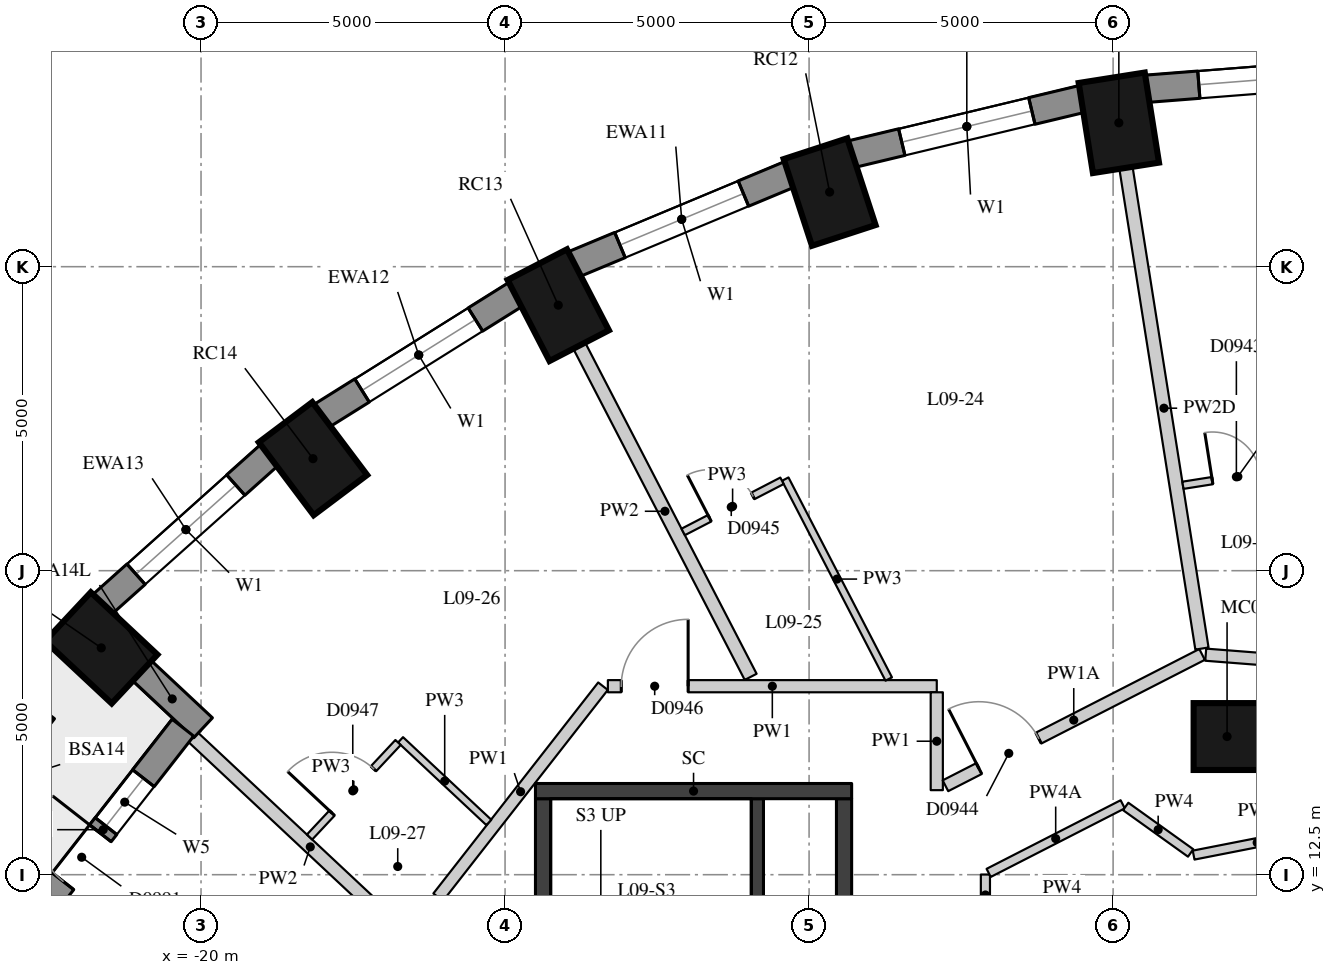
"""IFC4 building model, lengths in metres.
Left out: names, types, materials, properties, quantities, classifications, styles, units other than length and angle.
Written with IfcOpenShell. Run it as: python <this file> out.ifc"""

import sys

from ifc_helpers import new_model, si_unit, direction, frame, frame_2d, origin, origin_2d, place, context, subcontext, project, spatial, rectangle, extrude, element, fill, save


model = new_model("IFC4")
c1 = context("Model", 3, precision=1e-05, world=origin(), true_north=direction((0.0, 1.0)))
c2 = subcontext(c1, "Body", "Model", "MODEL_VIEW")
j1 = project(units=[si_unit("LENGTHUNIT", "METRE"), si_unit("PLANEANGLEUNIT", "RADIAN")], contexts=[c1])
p1 = place(None, origin())
s1 = spatial("IfcSite", under=j1, at=p1, CompositionType="ELEMENT")
p2 = place(p1, origin())
s2 = spatial("IfcBuilding", under=s1, at=p2, CompositionType="ELEMENT")
p3 = place(p2, frame((0.0, 0.0, 38.2)))
s3 = spatial("IfcBuildingStorey", under=s2, at=p3, CompositionType="ELEMENT", Elevation=38.2)
for number, where, z_axis, x_axis in (
    (1, (-4.906, 24.866, 0.0), (0.0, 0.0, 1.0), (-0.156, 0.988, 0.0)),
    (2, (-9.662, 23.727, 0.0), (0.0, 0.0, 1.0), (-0.31, 0.951, 0.0)),
    (3, (-14.125, 21.867, 0.0), (0.0, 0.0, 1.0), (-0.46, 0.888, 0.0)),
    (4, (-18.159, 19.343, 0.0), (0.0, 0.0, 1.0), (-0.601, 0.799, 0.0)),
    (5, (-21.641, 16.23, 0.0), (0.0, 0.0, 1.0), (-0.73, 0.683, 0.0)),
):
    element("IfcColumn", number, at=place(p3, frame(where, z_axis=z_axis, x_axis=x_axis)), inside=s3, PredefinedType="COLUMN", context=c2, shape_type="SweptSolid", body=[
        extrude(rectangle(XDim=1.5, YDim=1.1, at=origin_2d()), origin(), (0.0, 0.0, 1.0), 3.3),
    ])
p4 = place(p3, frame((-3.126, 14.772, 0.0), z_axis=(0.0, 0.0, 1.0), x_axis=(1.0, 0.0, 0.0)))
e6 = element("IfcColumn", 6, at=p4, inside=s3, PredefinedType="COLUMN", context=c2, shape_type="SweptSolid", body=[
    extrude(rectangle(XDim=1.1, YDim=1.1, at=origin_2d()), origin(), (0.0, 0.0, 1.0), 3.3),
])
p5 = place(p3, frame((-0.53, 25.733, 0.0), z_axis=(0.0, 0.0, 1.0), x_axis=(-0.996955972145, -0.077966592873, 0.0)))
e7 = element("IfcWall", 7, at=p5, inside=s3, PredefinedType="SOLIDWALL", context=c2, shape_type="SweptSolid", body=[
    extrude(rectangle(XDim=3.939, YDim=0.45, at=frame_2d((1.97, 0.0))), origin(), (0.0, 0.0, 1.0), 3.02),
])
p6 = place(p5, frame((0.87, 0.0, 0.4)))
e8 = element("IfcOpeningElement", 8, at=p6, cuts=e7, PredefinedType="OPENING", context=c2, shape_type="SweptSolid", body=[
    extrude(rectangle(XDim=2.2, YDim=1.75, at=frame_2d((1.1, 0.875))), frame((0.0, 0.235, 0.0), z_axis=(0.0, -1.0, 0.0), x_axis=(1.0, 0.0, 0.0)), (0.0, 0.0, 1.0), 0.47),
])
p7 = place(p3, frame((-5.504, 25.26, 0.0), z_axis=(0.0, 0.0, 1.0), x_axis=(-0.972496561493, -0.232917233979, 0.0)))
e9 = element("IfcWall", 9, at=p7, inside=s3, PredefinedType="SOLIDWALL", context=c2, shape_type="SweptSolid", body=[
    extrude(rectangle(XDim=3.911, YDim=0.45, at=frame_2d((1.956, 0.0))), origin(), (0.0, 0.0, 1.0), 3.02),
])
p8 = place(p7, frame((0.855, 0.0, 0.4)))
e10 = element("IfcOpeningElement", 10, at=p8, cuts=e9, PredefinedType="OPENING", context=c2, shape_type="SweptSolid", body=[
    extrude(rectangle(XDim=2.2, YDim=1.75, at=frame_2d((1.1, 0.875))), frame((0.0, 0.235, 0.0), z_axis=(0.0, -1.0, 0.0), x_axis=(1.0, 0.0, 0.0)), (0.0, 0.0, 1.0), 0.47),
])
p9 = place(p3, frame((-10.315, 24.021, 0.0), z_axis=(0.0, 0.0, 1.0), x_axis=(-0.923031964282, -0.384723267966, 0.0)))
e11 = element("IfcWall", 11, at=p9, inside=s3, PredefinedType="SOLIDWALL", context=c2, shape_type="SweptSolid", body=[
    extrude(rectangle(XDim=3.856, YDim=0.45, at=frame_2d((1.928, 0.0))), origin(), (0.0, 0.0, 1.0), 3.02),
])
p10 = place(p9, frame((0.828, 0.0, 0.4)))
e12 = element("IfcOpeningElement", 12, at=p10, cuts=e11, PredefinedType="OPENING", context=c2, shape_type="SweptSolid", body=[
    extrude(rectangle(XDim=2.2, YDim=1.75, at=frame_2d((1.1, 0.875))), frame((0.0, 0.235, 0.0), z_axis=(0.0, -1.0, 0.0), x_axis=(1.0, 0.0, 0.0)), (0.0, 0.0, 1.0), 0.47),
])
p11 = place(p3, frame((-14.817, 22.051, 0.0), z_axis=(0.0, 0.0, 1.0), x_axis=(-0.847635480093, -0.530579016629, 0.0)))
e13 = element("IfcWall", 13, at=p11, inside=s3, PredefinedType="SOLIDWALL", context=c2, shape_type="SweptSolid", body=[
    extrude(rectangle(XDim=3.782, YDim=0.45, at=frame_2d((1.891, 0.0))), origin(), (0.0, 0.0, 1.0), 3.02),
])
p12 = place(p11, frame((0.791, 0.0, 0.4)))
e14 = element("IfcOpeningElement", 14, at=p12, cuts=e13, PredefinedType="OPENING", context=c2, shape_type="SweptSolid", body=[
    extrude(rectangle(XDim=2.2, YDim=1.75, at=frame_2d((1.1, 0.875))), frame((0.0, 0.235, 0.0), z_axis=(0.0, -1.0, 0.0), x_axis=(1.0, 0.0, 0.0)), (0.0, 0.0, 1.0), 0.47),
])
p13 = place(p3, frame((-18.871, 19.407, 0.0), z_axis=(0.0, 0.0, 1.0), x_axis=(-0.745526233716, -0.66647628228, 0.0)))
e15 = element("IfcWall", 15, at=p13, inside=s3, PredefinedType="SOLIDWALL", context=c2, shape_type="SweptSolid", body=[
    extrude(rectangle(XDim=3.697, YDim=0.45, at=frame_2d((1.848, 0.0))), origin(), (0.0, 0.0, 1.0), 3.02),
])
p14 = place(p13, frame((0.749, 0.0, 0.4)))
e16 = element("IfcOpeningElement", 16, at=p14, cuts=e15, PredefinedType="OPENING", context=c2, shape_type="SweptSolid", body=[
    extrude(rectangle(XDim=2.2, YDim=1.75, at=frame_2d((1.1, 0.875))), frame((0.0, 0.235, 0.0), z_axis=(0.0, -1.0, 0.0), x_axis=(1.0, 0.0, 0.0)), (0.0, 0.0, 1.0), 0.47),
])
p15 = place(p3, frame((-20.982, 15.866, 0.0), z_axis=(0.0, 0.0, 1.0), x_axis=(0.730062381614, -0.683380508174, 0.0)))
e17 = element("IfcWall", 17, at=p15, inside=s3, PredefinedType="SOLIDWALL", context=c2, shape_type="SweptSolid", body=[
    extrude(rectangle(XDim=1.391, YDim=0.45, at=frame_2d((0.696, 0.0))), origin(), (0.0, 0.0, 1.0), 3.02),
])
p16 = place(p3, frame((-20.298, 14.918, 0.0), z_axis=(0.0, 0.0, 1.0), x_axis=(-0.615578403957, -0.788075649022, 0.0)))
e18 = element("IfcWall", 18, at=p16, inside=s3, PredefinedType="SOLIDWALL", context=c2, shape_type="SweptSolid", body=[
    extrude(rectangle(XDim=4.259, YDim=0.45, at=frame_2d((2.129, 0.0))), origin(), (0.0, 0.0, 1.0), 3.02),
])
p17 = place(p16, frame((1.054, 0.0, 0.4)))
e19 = element("IfcOpeningElement", 19, at=p17, cuts=e18, PredefinedType="OPENING", context=c2, shape_type="SweptSolid", body=[
    extrude(rectangle(XDim=1.0, YDim=1.75, at=frame_2d((0.5, 0.875))), frame((0.0, 0.235, 0.0), z_axis=(0.0, -1.0, 0.0), x_axis=(1.0, 0.0, 0.0)), (0.0, 0.0, 1.0), 0.47),
])
p18 = place(p16, frame((2.204, 0.0, 0.0)))
e20 = element("IfcOpeningElement", 20, at=p18, cuts=e18, PredefinedType="OPENING", context=c2, shape_type="SweptSolid", body=[
    extrude(rectangle(XDim=1.0, YDim=2.15, at=frame_2d((0.5, 1.075))), frame((0.0, 0.235, 0.0), z_axis=(0.0, -1.0, 0.0), x_axis=(1.0, 0.0, 0.0)), (0.0, 0.0, 1.0), 0.47),
])
p19 = place(p3, frame((-22.686, 15.281, 0.0), z_axis=(0.0, 0.0, 1.0), x_axis=(-0.616622746332, -0.787258781282, 0.0)))
e21 = element("IfcWall", 21, at=p19, inside=s3, PredefinedType="USERDEFINED", context=c2, shape_type="SweptSolid", body=[
    extrude(rectangle(XDim=1.8, YDim=0.7, at=frame_2d((0.9, 0.0))), origin(), (0.0, 0.0, 1.0), 0.75),
])
p20 = place(p3, frame((-10.85, 7.75, 0.0), z_axis=(0.0, 0.0, 1.0), x_axis=(0.0, 1.0, 0.0)))
e22 = element("IfcWall", 22, at=p20, inside=s3, PredefinedType="SHEAR", context=c2, shape_type="SweptSolid", body=[
    extrude(rectangle(XDim=6.0, YDim=0.2, at=frame_2d((3.0, 0.0))), origin(), (0.0, 0.0, 1.0), 3.02),
])
p21 = place(p20, frame((0.1, 0.0, 0.0)))
e23 = element("IfcOpeningElement", 23, at=p21, cuts=e22, PredefinedType="OPENING", context=c2, shape_type="SweptSolid", body=[
    extrude(rectangle(XDim=1.5, YDim=2.1, at=frame_2d((0.75, 1.05))), frame((0.0, 0.11, 0.0), z_axis=(0.0, -1.0, 0.0), x_axis=(1.0, 0.0, 0.0)), (0.0, 0.0, 1.0), 0.22),
])
p22 = place(p3, frame((-14.375, 7.75, -0.28), z_axis=(0.0, 0.0, 1.0), x_axis=(0.0, 1.0, 0.0)))
e24 = element("IfcWall", 24, at=p22, inside=s3, PredefinedType="SHEAR", context=c2, shape_type="SweptSolid", body=[
    extrude(rectangle(XDim=6.0, YDim=0.25, at=frame_2d((3.0, 0.0))), origin(), (0.0, 0.0, 1.0), 3.3),
])
p23 = place(p3, frame((-9.425, 7.75, -0.28), z_axis=(0.0, 0.0, 1.0), x_axis=(0.0, 1.0, 0.0)))
e25 = element("IfcWall", 25, at=p23, inside=s3, PredefinedType="SHEAR", context=c2, shape_type="SweptSolid", body=[
    extrude(rectangle(XDim=6.0, YDim=0.25, at=frame_2d((3.0, 0.0))), origin(), (0.0, 0.0, 1.0), 3.3),
])
p24 = place(p23, frame((2.1, 0.0, 0.28)))
e26 = element("IfcOpeningElement", 26, at=p24, cuts=e25, PredefinedType="OPENING", context=c2, shape_type="SweptSolid", body=[
    extrude(rectangle(XDim=1.5, YDim=2.1, at=frame_2d((0.75, 1.05))), frame((0.0, 0.135, 0.0), z_axis=(0.0, -1.0, 0.0), x_axis=(1.0, 0.0, 0.0)), (0.0, 0.0, 1.0), 0.27),
])
p25 = place(p3, frame((-14.5, 13.875, -0.28), z_axis=(0.0, 0.0, 1.0), x_axis=(1.0, 0.0, 0.0)))
e27 = element("IfcWall", 27, at=p25, inside=s3, PredefinedType="SHEAR", context=c2, shape_type="SweptSolid", body=[
    extrude(rectangle(XDim=5.2, YDim=0.25, at=frame_2d((2.6, 0.0))), origin(), (0.0, 0.0, 1.0), 3.3),
])
p26 = place(p3, frame((-16.1, 12.13, 0.0), z_axis=(0.0, 0.0, 1.0), x_axis=(0.615593476668, 0.788063875256, 0.0)))
e28 = element("IfcWall", 28, at=p26, inside=s3, PredefinedType="PARTITIONING", context=c2, shape_type="SweptSolid", body=[
    extrude(rectangle(XDim=4.404, YDim=0.2, at=frame_2d((2.202, 0.0))), origin(), (0.0, 0.0, 1.0), 3.02),
])
p27 = place(p3, frame((-13.309, 15.6, 0.0), z_axis=(0.0, 0.0, 1.0), x_axis=(1.0, 0.0, 0.0)))
e29 = element("IfcWall", 29, at=p27, inside=s3, PredefinedType="PARTITIONING", context=c2, shape_type="SweptSolid", body=[
    extrude(rectangle(XDim=5.409, YDim=0.2, at=frame_2d((2.705, 0.0))), origin(), (0.0, 0.0, 1.0), 3.02),
])
p28 = place(p27, frame((0.22, 0.0, 0.0)))
e30 = element("IfcOpeningElement", 30, at=p28, cuts=e29, PredefinedType="OPENING", context=c2, shape_type="SweptSolid", body=[
    extrude(rectangle(XDim=1.1, YDim=2.1, at=frame_2d((0.55, 1.05))), frame((0.0, 0.11, 0.0), z_axis=(0.0, -1.0, 0.0), x_axis=(1.0, 0.0, 0.0)), (0.0, 0.0, 1.0), 0.22),
])
p29 = place(p3, frame((-7.9, 15.5, 0.0), z_axis=(0.0, 0.0, 1.0), x_axis=(0.0, -1.0, 0.0)))
e31 = element("IfcWall", 31, at=p29, inside=s3, PredefinedType="PARTITIONING", context=c2, shape_type="SweptSolid", body=[
    extrude(rectangle(XDim=1.61, YDim=0.2, at=frame_2d((0.805, 0.0))), origin(), (0.0, 0.0, 1.0), 3.02),
])
p30 = place(p3, frame((-7.757, 13.963, 0.0), z_axis=(0.0, 0.0, 1.0), x_axis=(0.89017531408, 0.455618162722, 0.0)))
e32 = element("IfcWall", 32, at=p30, inside=s3, PredefinedType="PARTITIONING", context=c2, shape_type="SweptSolid", body=[
    extrude(rectangle(XDim=4.741, YDim=0.2, at=frame_2d((2.371, 0.0))), origin(), (0.0, 0.0, 1.0), 2.57),
])
p31 = place(p30, frame((0.62, 0.0, 0.0)))
e33 = element("IfcOpeningElement", 33, at=p31, cuts=e32, PredefinedType="OPENING", context=c2, shape_type="SweptSolid", body=[
    extrude(rectangle(XDim=1.1, YDim=2.1, at=frame_2d((0.55, 1.05))), frame((0.0, 0.11, 0.0), z_axis=(0.0, -1.0, 0.0), x_axis=(1.0, 0.0, 0.0)), (0.0, 0.0, 1.0), 0.22),
])
p32 = place(p3, frame((-3.477, 16.118, 0.0), z_axis=(0.0, 0.0, 1.0), x_axis=(0.996970328684, -0.077782798383, 0.0)))
e34 = element("IfcWall", 34, at=p32, inside=s3, PredefinedType="PARTITIONING", context=c2, shape_type="SweptSolid", body=[
    extrude(rectangle(XDim=10.449, YDim=0.2, at=frame_2d((5.225, 0.0))), origin(), (0.0, 0.0, 1.0), 3.02),
])
p33 = place(p32, frame((2.372, 0.0, 0.0)))
e35 = element("IfcOpeningElement", 35, at=p33, cuts=e34, PredefinedType="OPENING", context=c2, shape_type="SweptSolid", body=[
    extrude(rectangle(XDim=1.1, YDim=2.1, at=frame_2d((0.55, 1.05))), frame((0.0, 0.11, 0.0), z_axis=(0.0, -1.0, 0.0), x_axis=(1.0, 0.0, 0.0)), (0.0, 0.0, 1.0), 0.22),
])
p34 = place(p3, frame((-3.676, 12.822, 0.0), z_axis=(0.0, 0.0, 1.0), x_axis=(0.981284032016, 0.192565958858, 0.0)))
e36 = element("IfcWall", 36, at=p34, inside=s3, PredefinedType="PARTITIONING", context=c2, shape_type="SweptSolid", body=[
    extrude(rectangle(XDim=2.13, YDim=0.15, at=frame_2d((1.065, 0.0))), origin(), (0.0, 0.0, 1.0), 3.02),
])
p35 = place(p3, frame((-7.1, 11.83, 0.0), z_axis=(0.0, 0.0, 1.0), x_axis=(0.0, 1.0, 0.0)))
e37 = element("IfcWall", 37, at=p35, inside=s3, PredefinedType="PARTITIONING", context=c2, shape_type="SweptSolid", body=[
    extrude(rectangle(XDim=0.672, YDim=0.15, at=frame_2d((0.336, 0.0))), origin(), (0.0, 0.0, 1.0), 3.02),
])
p36 = place(p3, frame((-7.047, 12.53, 0.0), z_axis=(0.0, 0.0, 1.0), x_axis=(0.890208185307, 0.455553934032, 0.0)))
e38 = element("IfcWall", 38, at=p36, inside=s3, PredefinedType="PARTITIONING", context=c2, shape_type="SweptSolid", body=[
    extrude(rectangle(XDim=2.477, YDim=0.15, at=frame_2d((1.238, 0.0))), origin(), (0.0, 0.0, 1.0), 2.57),
])
p37 = place(p3, frame((-4.793, 13.623, 0.0), z_axis=(0.0, 0.0, 1.0), x_axis=(0.812853780358, -0.582467794611, 0.0)))
e39 = element("IfcWall", 39, at=p37, inside=s3, PredefinedType="PARTITIONING", context=c2, shape_type="SweptSolid", body=[
    extrude(rectangle(XDim=1.314, YDim=0.15, at=frame_2d((0.657, 0.0))), origin(), (0.0, 0.0, 1.0), 3.02),
])
p38 = place(p3, frame((-4.788, 24.125, 0.0), z_axis=(0.0, 0.0, 1.0), x_axis=(0.156108238506, -0.987739954578, 0.0)))
e40 = element("IfcWall", 40, at=p38, inside=s3, PredefinedType="PARTITIONING", context=c2, shape_type="SweptSolid", body=[
    extrude(rectangle(XDim=8.004, YDim=0.22, at=frame_2d((4.002, 0.0))), origin(), (0.0, 0.0, 1.0), 2.47),
])
p39 = place(p3, frame((-13.78, 21.201, 0.0), z_axis=(0.0, 0.0, 1.0), x_axis=(0.459699000582, -0.888074787878, 0.0)))
e41 = element("IfcWall", 41, at=p39, inside=s3, PredefinedType="PARTITIONING", context=c2, shape_type="SweptSolid", body=[
    extrude(rectangle(XDim=6.134, YDim=0.22, at=frame_2d((3.067, 0.0))), origin(), (0.0, 0.0, 1.0), 3.02),
])
p40 = place(p3, frame((-20.133, 14.764, 0.0), z_axis=(0.0, 0.0, 1.0), x_axis=(0.730065516357, -0.68337715928, 0.0)))
e42 = element("IfcWall", 42, at=p40, inside=s3, PredefinedType="PARTITIONING", context=c2, shape_type="SweptSolid", body=[
    extrude(rectangle(XDim=5.287, YDim=0.22, at=frame_2d((2.643, 0.0))), origin(), (0.0, 0.0, 1.0), 3.02),
])
p41 = place(p3, frame((-8.69, 15.718, 0.0), z_axis=(0.0, 0.0, 1.0), x_axis=(-0.45967225044, 0.888088634189, 0.0)))
e43 = element("IfcWall", 43, at=p41, inside=s3, PredefinedType="PARTITIONING", context=c2, shape_type="SweptSolid", body=[
    extrude(rectangle(XDim=3.702, YDim=0.12, at=frame_2d((1.851, 0.0))), origin(), (0.0, 0.0, 1.0), 3.02),
])
p42 = place(p3, frame((-15.267, 13.359, 0.0), z_axis=(0.0, 0.0, 1.0), x_axis=(-0.730103481834, 0.683336597742, 0.0)))
e44 = element("IfcWall", 44, at=p42, inside=s3, PredefinedType="PARTITIONING", context=c2, shape_type="SweptSolid", body=[
    extrude(rectangle(XDim=1.989, YDim=0.12, at=frame_2d((0.995, 0.0))), origin(), (0.0, 0.0, 1.0), 3.02),
])
p43 = place(p3, frame((-2.044, 19.19, 0.0), z_axis=(0.0, 0.0, 1.0), x_axis=(-0.987722911621, -0.15621603586, 0.0)))
e45 = element("IfcWall", 45, at=p43, inside=s3, PredefinedType="PARTITIONING", context=c2, shape_type="SweptSolid", body=[
    extrude(rectangle(XDim=1.83, YDim=0.12, at=frame_2d((0.915, 0.0))), origin(), (0.0, 0.0, 1.0), 3.02),
])
p44 = place(p43, frame((0.54, 0.0, 0.0)))
e46 = element("IfcOpeningElement", 46, at=p44, cuts=e45, PredefinedType="OPENING", context=c2, shape_type="SweptSolid", body=[
    extrude(rectangle(XDim=0.8, YDim=2.1, at=frame_2d((0.4, 1.05))), frame((0.0, 0.07, 0.0), z_axis=(0.0, -1.0, 0.0), x_axis=(1.0, 0.0, 0.0)), (0.0, 0.0, 1.0), 0.14),
])
p45 = place(p3, frame((-10.445, 18.978, 0.0), z_axis=(0.0, 0.0, 1.0), x_axis=(-0.888095574179, -0.459658842104, 0.0)))
e47 = element("IfcWall", 47, at=p45, inside=s3, PredefinedType="PARTITIONING", context=c2, shape_type="SweptSolid", body=[
    extrude(rectangle(XDim=1.83, YDim=0.12, at=frame_2d((0.915, 0.0))), origin(), (0.0, 0.0, 1.0), 3.02),
])
p46 = place(p45, frame((0.54, 0.0, 0.0)))
e48 = element("IfcOpeningElement", 48, at=p46, cuts=e47, PredefinedType="OPENING", context=c2, shape_type="SweptSolid", body=[
    extrude(rectangle(XDim=0.8, YDim=2.1, at=frame_2d((0.4, 1.05))), frame((0.0, 0.07, 0.0), z_axis=(0.0, -1.0, 0.0), x_axis=(1.0, 0.0, 0.0)), (0.0, 0.0, 1.0), 0.14),
])
p47 = place(p3, frame((-16.76, 14.674, 0.0), z_axis=(0.0, 0.0, 1.0), x_axis=(-0.683334594436, -0.730105356813, 0.0)))
e49 = element("IfcWall", 49, at=p47, inside=s3, PredefinedType="PARTITIONING", context=c2, shape_type="SweptSolid", body=[
    extrude(rectangle(XDim=2.13, YDim=0.12, at=frame_2d((1.065, 0.0))), origin(), (0.0, 0.0, 1.0), 3.02),
])
p48 = place(p47, frame((0.59, 0.0, 0.0)))
e50 = element("IfcOpeningElement", 50, at=p48, cuts=e49, PredefinedType="OPENING", context=c2, shape_type="SweptSolid", body=[
    extrude(rectangle(XDim=1.0, YDim=2.1, at=frame_2d((0.5, 1.05))), frame((0.0, 0.07, 0.0), z_axis=(0.0, -1.0, 0.0), x_axis=(1.0, 0.0, 0.0)), (0.0, 0.0, 1.0), 0.14),
])
p49 = place(p6, origin())
e51 = element("IfcWindow", 51, at=p49, inside=s3, PartitioningType="SINGLE_PANEL", PredefinedType="WINDOW", context=c2, shape_type="SweptSolid", body=[
    extrude(rectangle(XDim=2.2, YDim=1.75, at=frame_2d((1.1, 0.875))), frame((0.0, 0.035, 0.0), z_axis=(0.0, -1.0, 0.0), x_axis=(1.0, 0.0, 0.0)), (0.0, 0.0, 1.0), 0.06),
])
fill(e8, e51)
p50 = place(p8, origin())
e52 = element("IfcWindow", 52, at=p50, inside=s3, PartitioningType="SINGLE_PANEL", PredefinedType="WINDOW", context=c2, shape_type="SweptSolid", body=[
    extrude(rectangle(XDim=2.2, YDim=1.75, at=frame_2d((1.1, 0.875))), frame((0.0, 0.035, 0.0), z_axis=(0.0, -1.0, 0.0), x_axis=(1.0, 0.0, 0.0)), (0.0, 0.0, 1.0), 0.06),
])
fill(e10, e52)
p51 = place(p10, origin())
e53 = element("IfcWindow", 53, at=p51, inside=s3, PartitioningType="SINGLE_PANEL", PredefinedType="WINDOW", context=c2, shape_type="SweptSolid", body=[
    extrude(rectangle(XDim=2.2, YDim=1.75, at=frame_2d((1.1, 0.875))), frame((0.0, 0.035, 0.0), z_axis=(0.0, -1.0, 0.0), x_axis=(1.0, 0.0, 0.0)), (0.0, 0.0, 1.0), 0.06),
])
fill(e12, e53)
p52 = place(p12, origin())
e54 = element("IfcWindow", 54, at=p52, inside=s3, PartitioningType="SINGLE_PANEL", PredefinedType="WINDOW", context=c2, shape_type="SweptSolid", body=[
    extrude(rectangle(XDim=2.2, YDim=1.75, at=frame_2d((1.1, 0.875))), frame((0.0, 0.035, 0.0), z_axis=(0.0, -1.0, 0.0), x_axis=(1.0, 0.0, 0.0)), (0.0, 0.0, 1.0), 0.06),
])
fill(e14, e54)
p53 = place(p14, origin())
e55 = element("IfcWindow", 55, at=p53, inside=s3, PartitioningType="SINGLE_PANEL", PredefinedType="WINDOW", context=c2, shape_type="SweptSolid", body=[
    extrude(rectangle(XDim=2.2, YDim=1.75, at=frame_2d((1.1, 0.875))), frame((0.0, 0.035, 0.0), z_axis=(0.0, -1.0, 0.0), x_axis=(1.0, 0.0, 0.0)), (0.0, 0.0, 1.0), 0.06),
])
fill(e16, e55)
p54 = place(p17, origin())
e56 = element("IfcWindow", 56, at=p54, inside=s3, PartitioningType="SINGLE_PANEL", PredefinedType="WINDOW", context=c2, shape_type="SweptSolid", body=[
    extrude(rectangle(XDim=1.0, YDim=1.75, at=frame_2d((0.5, 0.875))), frame((0.0, 0.035, 0.0), z_axis=(0.0, -1.0, 0.0), x_axis=(1.0, 0.0, 0.0)), (0.0, 0.0, 1.0), 0.06),
])
fill(e19, e56)
p55 = place(p18, frame((1.0, 0.0, 0.0), z_axis=(0.0, 0.0, 1.0), x_axis=(-1.0, 0.0, 0.0)))
e57 = element("IfcDoor", 57, at=p55, inside=s3, OperationType="SINGLE_SWING_RIGHT", PredefinedType="DOOR", context=c2, shape_type="SweptSolid", body=[
    extrude(rectangle(XDim=1.0, YDim=2.15, at=frame_2d((0.5, 1.075))), frame((0.0, 0.075, 0.0), z_axis=(0.0, -1.0, 0.0), x_axis=(1.0, 0.0, 0.0)), (0.0, 0.0, 1.0), 0.05),
])
fill(e20, e57)
p56 = place(p44, origin())
e58 = element("IfcDoor", 58, at=p56, inside=s3, OperationType="SINGLE_SWING_LEFT", PredefinedType="DOOR", context=c2, shape_type="SweptSolid", body=[
    extrude(rectangle(XDim=0.8, YDim=2.1, at=frame_2d((0.4, 1.05))), frame((0.0, 0.025, 0.0), z_axis=(0.0, -1.0, 0.0), x_axis=(1.0, 0.0, 0.0)), (0.0, 0.0, 1.0), 0.05),
])
fill(e46, e58)
p57 = place(p31, origin())
e59 = element("IfcDoor", 59, at=p57, inside=s3, OperationType="SINGLE_SWING_LEFT", PredefinedType="DOOR", context=c2, shape_type="SweptSolid", body=[
    extrude(rectangle(XDim=1.1, YDim=2.1, at=frame_2d((0.55, 1.05))), frame((0.0, 0.025, 0.0), z_axis=(0.0, -1.0, 0.0), x_axis=(1.0, 0.0, 0.0)), (0.0, 0.0, 1.0), 0.05),
])
fill(e33, e59)
p58 = place(p46, origin())
e60 = element("IfcDoor", 60, at=p58, inside=s3, OperationType="SINGLE_SWING_LEFT", PredefinedType="DOOR", context=c2, shape_type="SweptSolid", body=[
    extrude(rectangle(XDim=0.8, YDim=2.1, at=frame_2d((0.4, 1.05))), frame((0.0, 0.025, 0.0), z_axis=(0.0, -1.0, 0.0), x_axis=(1.0, 0.0, 0.0)), (0.0, 0.0, 1.0), 0.05),
])
fill(e48, e60)
p59 = place(p28, origin())
e61 = element("IfcDoor", 61, at=p59, inside=s3, OperationType="SINGLE_SWING_RIGHT", PredefinedType="DOOR", context=c2, shape_type="SweptSolid", body=[
    extrude(rectangle(XDim=1.1, YDim=2.1, at=frame_2d((0.55, 1.05))), frame((0.0, 0.025, 0.0), z_axis=(0.0, -1.0, 0.0), x_axis=(1.0, 0.0, 0.0)), (0.0, 0.0, 1.0), 0.05),
])
fill(e30, e61)
p60 = place(p48, origin())
e62 = element("IfcDoor", 62, at=p60, inside=s3, OperationType="SINGLE_SWING_LEFT", PredefinedType="DOOR", context=c2, shape_type="SweptSolid", body=[
    extrude(rectangle(XDim=1.0, YDim=2.1, at=frame_2d((0.5, 1.05))), frame((0.0, 0.025, 0.0), z_axis=(0.0, -1.0, 0.0), x_axis=(1.0, 0.0, 0.0)), (0.0, 0.0, 1.0), 0.05),
])
fill(e50, e62)
save(model, sys.argv[1])
